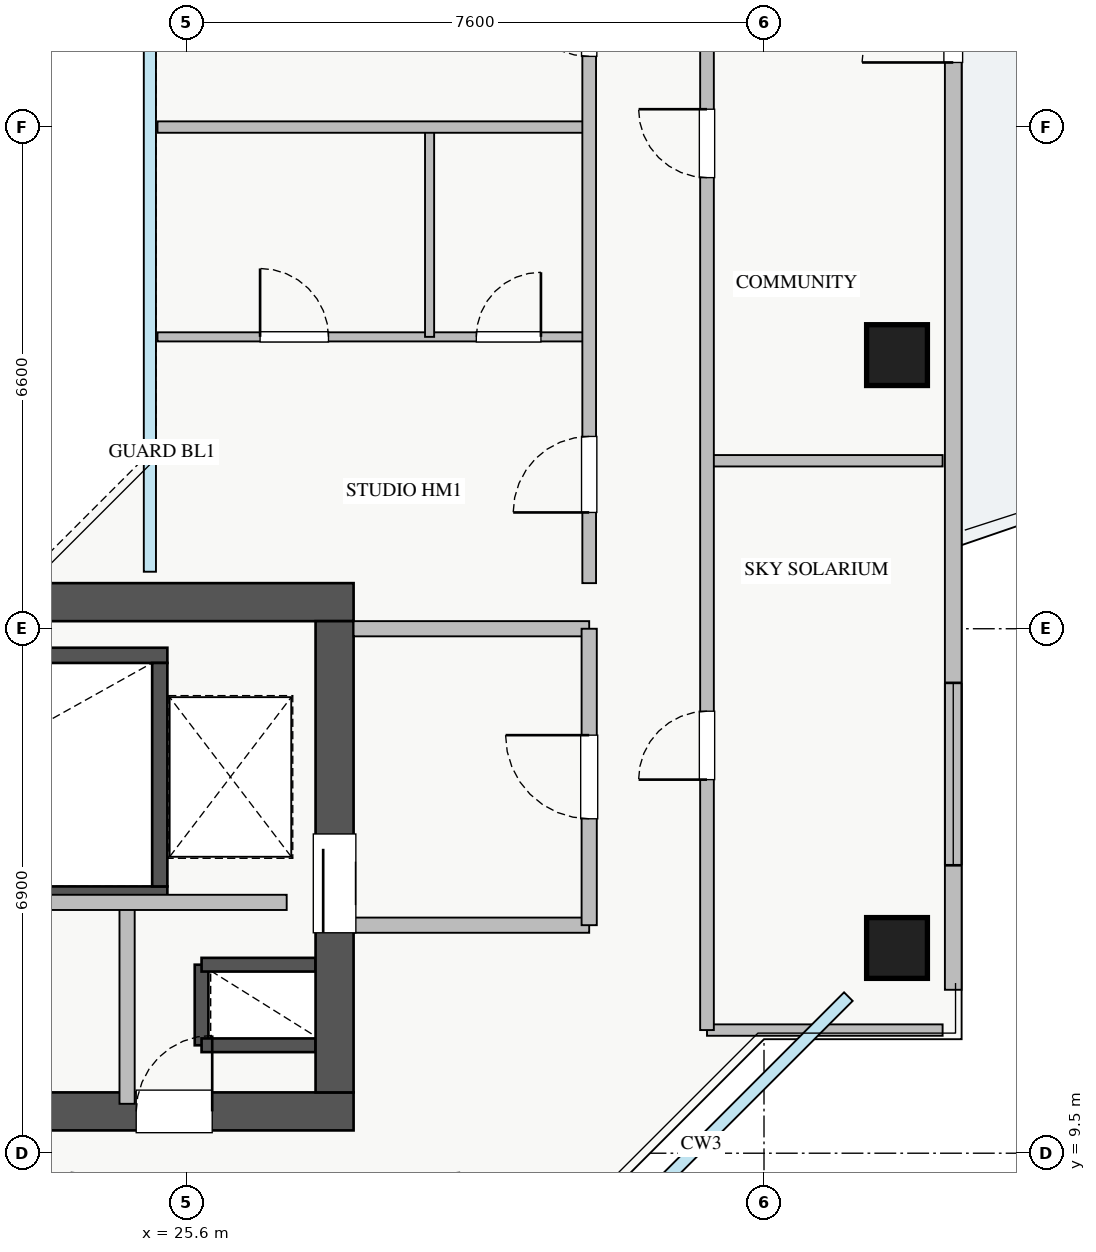
"""IFC4 building model, lengths in metres.
Left out: names, types, materials, properties, quantities, classifications, styles, units other than length and angle.
Written with IfcOpenShell. Run it as: python <this file> out.ifc"""

import sys

from ifc_helpers import new_model, si_unit, direction, frame, frame_2d, origin, origin_2d, place, context, subcontext, project, spatial, rectangle, extrude, source, transform, mapped, element, fill, save


model = new_model("IFC4")
c1 = context("Model", 3, precision=1e-05, world=origin(), true_north=direction((0.0, 1.0)))
c2 = subcontext(c1, "Body", "Model", "MODEL_VIEW")
j1 = project(units=[si_unit("LENGTHUNIT", "METRE"), si_unit("PLANEANGLEUNIT", "RADIAN")], contexts=[c1])
p1 = place(None, origin())
s1 = spatial("IfcSite", under=j1, at=p1, CompositionType="ELEMENT")
p2 = place(p1, origin())
s2 = spatial("IfcBuilding", under=s1, at=p2, CompositionType="ELEMENT")
p3 = place(p2, frame((0.0, 0.0, 206.75)))
s3 = spatial("IfcBuildingStorey", under=s2, at=p3, CompositionType="ELEMENT", Elevation=206.75)
p4 = place(p3, frame((25.8, 10.92, 0.0), z_axis=(0.0, 0.0, 1.0), x_axis=(0.0, 1.0, 0.0)))
e1 = element("IfcWall", 1, at=p4, inside=s3, PredefinedType="SHEAR", context=c2, shape_type="SweptSolid", body=[
    extrude(rectangle(XDim=1.06, YDim=0.18, at=frame_2d((0.53, 0.0))), origin(), (0.0, 0.0, 1.0), 3.07),
])
for number, where, z_axis, x_axis in (
    (2, (25.8, 11.98, 0.0), (0.0, 0.0, 1.0), (1.0, 0.0, 0.0)),
    (3, (25.8, 10.92, 0.0), (0.0, 0.0, 1.0), (1.0, 0.0, 0.0)),
):
    element("IfcWall", number, at=place(p3, frame(where, z_axis=z_axis, x_axis=x_axis)), inside=s3, PredefinedType="SHEAR", context=c2, shape_type="SweptSolid", body=[
        extrude(rectangle(XDim=1.5, YDim=0.18, at=frame_2d((0.75, 0.0))), origin(), (0.0, 0.0, 1.0), 3.07),
    ])
p5 = place(p3, frame((18.2, 12.91, 0.0), z_axis=(0.0, 0.0, 1.0), x_axis=(1.0, 0.0, 0.0)))
e4 = element("IfcWall", 4, at=p5, inside=s3, PredefinedType="SHEAR", context=c2, shape_type="SweptSolid", body=[
    extrude(rectangle(XDim=7.15, YDim=0.2, at=frame_2d((3.575, 0.0))), origin(), (0.0, 0.0, 1.0), 3.25),
])
p6 = place(p5, frame((0.35, 0.0, 0.0)))
e5 = element("IfcOpeningElement", 5, at=p6, cuts=e4, PredefinedType="OPENING", context=c2, shape_type="SweptSolid", body=[
    extrude(rectangle(XDim=1.1, YDim=2.05, at=frame_2d((0.55, 1.025))), frame((0.0, 0.11, 0.0), z_axis=(0.0, -1.0, 0.0), x_axis=(1.0, 0.0, 0.0)), (0.0, 0.0, 1.0), 0.22),
])
p7 = place(p3, frame((18.2, 16.05, 0.0), z_axis=(0.0, 0.0, 1.0), x_axis=(1.0, 0.0, 0.0)))
e6 = element("IfcWall", 6, at=p7, inside=s3, PredefinedType="SHEAR", context=c2, shape_type="SweptSolid", body=[
    extrude(rectangle(XDim=7.15, YDim=0.2, at=frame_2d((3.575, 0.0))), origin(), (0.0, 0.0, 1.0), 3.25),
])
p8 = place(p3, frame((25.25, 13.01, 0.0), z_axis=(0.0, 0.0, 1.0), x_axis=(0.0, 1.0, 0.0)))
e7 = element("IfcWall", 7, at=p8, inside=s3, PredefinedType="SHEAR", context=c2, shape_type="SweptSolid", body=[
    extrude(rectangle(XDim=2.94, YDim=0.2, at=frame_2d((1.47, 0.0))), origin(), (0.0, 0.0, 1.0), 3.25),
])
p9 = place(p3, frame((10.2, 10.05, 0.0), z_axis=(0.0, 0.0, 1.0), x_axis=(1.0, 0.0, 0.0)))
e8 = element("IfcWall", 8, at=p9, inside=s3, PredefinedType="SHEAR", context=c2, shape_type="SweptSolid", body=[
    extrude(rectangle(XDim=17.6, YDim=0.5, at=frame_2d((8.8, 0.0))), origin(), (0.0, 0.0, 1.0), 3.25),
])
p10 = place(p9, frame((1.15, 0.0, 0.0)))
e9 = element("IfcOpeningElement", 9, at=p10, cuts=e8, PredefinedType="OPENING", context=c2, shape_type="SweptSolid", body=[
    extrude(rectangle(XDim=1.1, YDim=2.05, at=frame_2d((0.55, 1.025))), frame((0.0, 0.26, 0.0), z_axis=(0.0, -1.0, 0.0), x_axis=(1.0, 0.0, 0.0)), (0.0, 0.0, 1.0), 0.52),
])
p11 = place(p9, frame((8.3, 0.0, 0.0)))
e10 = element("IfcOpeningElement", 10, at=p11, cuts=e8, PredefinedType="OPENING", context=c2, shape_type="SweptSolid", body=[
    extrude(rectangle(XDim=1.1, YDim=2.05, at=frame_2d((0.55, 1.025))), frame((0.0, 0.26, 0.0), z_axis=(0.0, -1.0, 0.0), x_axis=(1.0, 0.0, 0.0)), (0.0, 0.0, 1.0), 0.52),
])
p12 = place(p9, frame((2.85, 0.0, 0.0)))
e11 = element("IfcOpeningElement", 11, at=p12, cuts=e8, PredefinedType="OPENING", context=c2, shape_type="SweptSolid", body=[
    extrude(rectangle(XDim=1.1, YDim=2.05, at=frame_2d((0.55, 1.025))), frame((0.0, 0.26, 0.0), z_axis=(0.0, -1.0, 0.0), x_axis=(1.0, 0.0, 0.0)), (0.0, 0.0, 1.0), 0.52),
])
p13 = place(p9, frame((5.8, 0.0, 0.0)))
e12 = element("IfcOpeningElement", 12, at=p13, cuts=e8, PredefinedType="OPENING", context=c2, shape_type="SweptSolid", body=[
    extrude(rectangle(XDim=1.0, YDim=2.05, at=frame_2d((0.5, 1.025))), frame((0.0, 0.26, 0.0), z_axis=(0.0, -1.0, 0.0), x_axis=(1.0, 0.0, 0.0)), (0.0, 0.0, 1.0), 0.52),
])
p14 = place(p9, frame((14.74, 0.0, 0.0)))
e13 = element("IfcOpeningElement", 13, at=p14, cuts=e8, PredefinedType="OPENING", context=c2, shape_type="SweptSolid", body=[
    extrude(rectangle(XDim=1.0, YDim=2.05, at=frame_2d((0.5, 1.025))), frame((0.0, 0.26, 0.0), z_axis=(0.0, -1.0, 0.0), x_axis=(1.0, 0.0, 0.0)), (0.0, 0.0, 1.0), 0.52),
])
p15 = place(p9, frame((11.67, 0.0, 0.0)))
e14 = element("IfcOpeningElement", 14, at=p15, cuts=e8, PredefinedType="OPENING", context=c2, shape_type="SweptSolid", body=[
    extrude(rectangle(XDim=1.0, YDim=2.05, at=frame_2d((0.5, 1.025))), frame((0.0, 0.26, 0.0), z_axis=(0.0, -1.0, 0.0), x_axis=(1.0, 0.0, 0.0)), (0.0, 0.0, 1.0), 0.52),
])
p16 = place(p3, frame((10.2, 16.75, 0.0), z_axis=(0.0, 0.0, 1.0), x_axis=(1.0, 0.0, 0.0)))
e15 = element("IfcWall", 15, at=p16, inside=s3, PredefinedType="SHEAR", context=c2, shape_type="SweptSolid", body=[
    extrude(rectangle(XDim=17.6, YDim=0.5, at=frame_2d((8.8, 0.0))), origin(), (0.0, 0.0, 1.0), 3.25),
])
p17 = place(p3, frame((27.55, 10.3, 0.0), z_axis=(0.0, 0.0, 1.0), x_axis=(0.0, 1.0, 0.0)))
e16 = element("IfcWall", 16, at=p17, inside=s3, PredefinedType="SHEAR", context=c2, shape_type="SweptSolid", body=[
    extrude(rectangle(XDim=6.2, YDim=0.5, at=frame_2d((3.1, 0.0))), origin(), (0.0, 0.0, 1.0), 3.25),
])
p18 = place(p17, frame((2.1, 0.0, 0.0)))
e17 = element("IfcOpeningElement", 17, at=p18, cuts=e16, PredefinedType="OPENING", context=c2, shape_type="SweptSolid", body=[
    extrude(rectangle(XDim=1.3, YDim=2.05, at=frame_2d((0.65, 1.025))), frame((0.0, 0.26, 0.0), z_axis=(0.0, -1.0, 0.0), x_axis=(1.0, 0.0, 0.0)), (0.0, 0.0, 1.0), 0.52),
])
m1 = source(origin(), c2, "Body", "SweptSolid", [
    extrude(rectangle(XDim=0.8, YDim=0.8, at=origin_2d()), origin(), (0.0, 0.0, 1.0), 3.25),
])
for number, where, z_axis, x_axis in (
    (18, (34.95, 12.2, 0.0), (0.0, 0.0, 1.0), (1.0, 0.0, 0.0)),
    (19, (34.95, 20.0, 0.0), (0.0, 0.0, 1.0), (1.0, 0.0, 0.0)),
):
    element("IfcColumn", number, at=place(p3, frame(where, z_axis=z_axis, x_axis=x_axis)), inside=s3, PredefinedType="COLUMN", context=c2, shape_type="MappedRepresentation", body=[
        mapped(m1, transform((0.0, 0.0, 0.0), x_axis=(1.0, 0.0, 0.0), y_axis=(0.0, 1.0, 0.0), z_axis=(0.0, 0.0, 1.0), scale=1.0)),
    ])
p19 = place(p3, frame((35.69, 11.65, 0.0), z_axis=(0.0, 0.0, 1.0), x_axis=(0.0, 1.0, 0.0)))
e20 = element("IfcWall", 20, at=p19, inside=s3, PredefinedType="STANDARD", context=c2, shape_type="SweptSolid", body=[
    extrude(rectangle(XDim=22.7, YDim=0.22, at=frame_2d((11.35, 0.0))), origin(), (0.0, 0.0, 1.0), 2.61),
])
p20 = place(p19, frame((12.2, 0.0, 0.0)))
e21 = element("IfcOpeningElement", 21, at=p20, cuts=e20, PredefinedType="OPENING", context=c2, shape_type="SweptSolid", body=[
    extrude(rectangle(XDim=1.2, YDim=2.1, at=frame_2d((0.6, 1.05))), frame((0.0, 0.12, 0.0), z_axis=(0.0, -1.0, 0.0), x_axis=(1.0, 0.0, 0.0)), (0.0, 0.0, 1.0), 0.24),
])
p21 = place(p19, frame((1.638, 0.0, 0.9)))
e22 = element("IfcOpeningElement", 22, at=p21, cuts=e20, PredefinedType="OPENING", context=c2, shape_type="SweptSolid", body=[
    extrude(rectangle(XDim=2.4, YDim=1.48, at=frame_2d((1.2, 0.74))), frame((0.0, 0.12, 0.0), z_axis=(0.0, -1.0, 0.0), x_axis=(1.0, 0.0, 0.0)), (0.0, 0.0, 1.0), 0.24),
])
p22 = place(p19, frame((18.813, 0.0, 0.9)))
e23 = element("IfcOpeningElement", 23, at=p22, cuts=e20, PredefinedType="OPENING", context=c2, shape_type="SweptSolid", body=[
    extrude(rectangle(XDim=2.1, YDim=1.48, at=frame_2d((1.05, 0.74))), frame((0.0, 0.12, 0.0), z_axis=(0.0, -1.0, 0.0), x_axis=(1.0, 0.0, 0.0)), (0.0, 0.0, 1.0), 0.24),
])
p23 = place(p3, frame((27.8, 16.4, 0.0), z_axis=(0.0, 0.0, 1.0), x_axis=(1.0, 0.0, 0.0)))
e24 = element("IfcWall", 24, at=p23, inside=s3, PredefinedType="PARTITIONING", context=c2, shape_type="SweptSolid", body=[
    extrude(rectangle(XDim=3.1, YDim=0.2, at=frame_2d((1.55, 0.0))), origin(), (0.0, 0.0, 1.0), 3.07),
])
p24 = place(p3, frame((27.8, 12.5, 0.0), z_axis=(0.0, 0.0, 1.0), x_axis=(1.0, 0.0, 0.0)))
e25 = element("IfcWall", 25, at=p24, inside=s3, PredefinedType="PARTITIONING", context=c2, shape_type="SweptSolid", body=[
    extrude(rectangle(XDim=3.1, YDim=0.2, at=frame_2d((1.55, 0.0))), origin(), (0.0, 0.0, 1.0), 2.265),
])
p25 = place(p3, frame((30.9, 12.5, 0.0), z_axis=(0.0, 0.0, 1.0), x_axis=(0.0, 1.0, 0.0)))
e26 = element("IfcWall", 26, at=p25, inside=s3, PredefinedType="PARTITIONING", context=c2, shape_type="SweptSolid", body=[
    extrude(rectangle(XDim=3.9, YDim=0.2, at=frame_2d((1.95, 0.0))), origin(), (0.0, 0.0, 1.0), 3.07),
])
p26 = place(p25, frame((1.4, 0.0, 0.0)))
e27 = element("IfcOpeningElement", 27, at=p26, cuts=e26, PredefinedType="OPENING", context=c2, shape_type="SweptSolid", body=[
    extrude(rectangle(XDim=1.1, YDim=2.05, at=frame_2d((0.55, 1.025))), frame((0.0, 0.11, 0.0), z_axis=(0.0, -1.0, 0.0), x_axis=(1.0, 0.0, 0.0)), (0.0, 0.0, 1.0), 0.22),
])
p27 = place(p3, frame((24.82, 10.15, 0.0), z_axis=(0.0, 0.0, 1.0), x_axis=(0.0, 1.0, 0.0)))
e28 = element("IfcWall", 28, at=p27, inside=s3, PredefinedType="PARTITIONING", context=c2, shape_type="SweptSolid", body=[
    extrude(rectangle(XDim=2.65, YDim=0.2, at=frame_2d((1.325, 0.0))), origin(), (0.0, 0.0, 1.0), 3.07),
])
p28 = place(p3, frame((21.75, 12.8, 0.0), z_axis=(0.0, 0.0, 1.0), x_axis=(1.0, 0.0, 0.0)))
e29 = element("IfcWall", 29, at=p28, inside=s3, PredefinedType="PARTITIONING", context=c2, shape_type="SweptSolid", body=[
    extrude(rectangle(XDim=5.17, YDim=0.2, at=frame_2d((2.585, 0.0))), origin(), (0.0, 0.0, 1.0), 3.07),
])
p29 = place(p3, frame((25.22, 20.24, 0.0), z_axis=(0.0, 0.0, 1.0), x_axis=(1.0, 0.0, 0.0)))
e30 = element("IfcWall", 30, at=p29, inside=s3, PredefinedType="PLUMBINGWALL", context=c2, shape_type="SweptSolid", body=[
    extrude(rectangle(XDim=5.68, YDim=0.12, at=frame_2d((2.84, 0.0))), origin(), (0.0, 0.0, 1.0), 2.675),
])
p30 = place(p29, frame((1.35, 0.0, 0.0)))
e31 = element("IfcOpeningElement", 31, at=p30, cuts=e30, PredefinedType="OPENING", context=c2, shape_type="SweptSolid", body=[
    extrude(rectangle(XDim=0.9, YDim=2.05, at=frame_2d((0.45, 1.025))), frame((0.0, 0.07, 0.0), z_axis=(0.0, -1.0, 0.0), x_axis=(1.0, 0.0, 0.0)), (0.0, 0.0, 1.0), 0.14),
])
p31 = place(p29, frame((4.195, 0.0, 0.0)))
e32 = element("IfcOpeningElement", 32, at=p31, cuts=e30, PredefinedType="OPENING", context=c2, shape_type="SweptSolid", body=[
    extrude(rectangle(XDim=0.85, YDim=2.05, at=frame_2d((0.425, 1.025))), frame((0.0, 0.07, 0.0), z_axis=(0.0, -1.0, 0.0), x_axis=(1.0, 0.0, 0.0)), (0.0, 0.0, 1.0), 0.14),
])
p32 = place(p3, frame((28.8, 20.24, 0.0), z_axis=(0.0, 0.0, 1.0), x_axis=(0.0, 1.0, 0.0)))
e33 = element("IfcWall", 33, at=p32, inside=s3, PredefinedType="PLUMBINGWALL", context=c2, shape_type="SweptSolid", body=[
    extrude(rectangle(XDim=2.76, YDim=0.12, at=frame_2d((1.38, 0.0))), origin(), (0.0, 0.0, 1.0), 3.07),
])
p33 = place(p3, frame((25.22, 23.0, 0.0), z_axis=(0.0, 0.0, 1.0), x_axis=(1.0, 0.0, 0.0)))
e34 = element("IfcWall", 34, at=p33, inside=s3, PredefinedType="PARTITIONING", context=c2, shape_type="SweptSolid", body=[
    extrude(rectangle(XDim=5.68, YDim=0.15, at=frame_2d((2.84, 0.0))), origin(), (0.0, 0.0, 1.0), 3.07),
])
p34 = place(p3, frame((30.9, 17.0, 0.0), z_axis=(0.0, 0.0, 1.0), x_axis=(0.0, 1.0, 0.0)))
e35 = element("IfcWall", 35, at=p34, inside=s3, PredefinedType="PARTITIONING", context=c2, shape_type="SweptSolid", body=[
    extrude(rectangle(XDim=12.0, YDim=0.18, at=frame_2d((6.0, 0.0))), origin(), (0.0, 0.0, 1.0), 3.07),
])
p35 = place(p34, frame((0.93, 0.0, 0.0)))
e36 = element("IfcOpeningElement", 36, at=p35, cuts=e35, PredefinedType="OPENING", context=c2, shape_type="SweptSolid", body=[
    extrude(rectangle(XDim=1.0, YDim=2.05, at=frame_2d((0.5, 1.025))), frame((0.0, 0.1, 0.0), z_axis=(0.0, -1.0, 0.0), x_axis=(1.0, 0.0, 0.0)), (0.0, 0.0, 1.0), 0.2),
])
p36 = place(p34, frame((6.93, 0.0, 0.0)))
e37 = element("IfcOpeningElement", 37, at=p36, cuts=e35, PredefinedType="OPENING", context=c2, shape_type="SweptSolid", body=[
    extrude(rectangle(XDim=1.0, YDim=2.05, at=frame_2d((0.5, 1.025))), frame((0.0, 0.1, 0.0), z_axis=(0.0, -1.0, 0.0), x_axis=(1.0, 0.0, 0.0)), (0.0, 0.0, 1.0), 0.2),
])
for number, where, z_axis, x_axis in (
    (38, (32.45, 11.12, 0.0), (0.0, 0.0, 1.0), (1.0, 0.0, 0.0)),
    (39, (32.45, 18.61, 0.0), (0.0, 0.0, 1.0), (1.0, 0.0, 0.0)),
):
    element("IfcWall", number, at=place(p3, frame(where, z_axis=z_axis, x_axis=x_axis)), inside=s3, PredefinedType="PARTITIONING", context=c2, shape_type="SweptSolid", body=[
        extrude(rectangle(XDim=3.1, YDim=0.15, at=frame_2d((1.55, 0.0))), origin(), (0.0, 0.0, 1.0), 3.07),
    ])
p37 = place(p3, frame((32.45, 11.12, 0.0), z_axis=(0.0, 0.0, 1.0), x_axis=(0.0, 1.0, 0.0)))
e40 = element("IfcWall", 40, at=p37, inside=s3, PredefinedType="PARTITIONING", context=c2, shape_type="SweptSolid", body=[
    extrude(rectangle(XDim=23.76, YDim=0.18, at=frame_2d((11.88, 0.0))), origin(), (0.0, 0.0, 1.0), 3.07),
])
p38 = place(p37, frame((3.295, 0.0, 0.0)))
e41 = element("IfcOpeningElement", 41, at=p38, cuts=e40, PredefinedType="OPENING", context=c2, shape_type="SweptSolid", body=[
    extrude(rectangle(XDim=0.9, YDim=2.05, at=frame_2d((0.45, 1.025))), frame((0.0, 0.1, 0.0), z_axis=(0.0, -1.0, 0.0), x_axis=(1.0, 0.0, 0.0)), (0.0, 0.0, 1.0), 0.2),
])
p39 = place(p37, frame((11.215, 0.0, 0.0)))
e42 = element("IfcOpeningElement", 42, at=p39, cuts=e40, PredefinedType="OPENING", context=c2, shape_type="SweptSolid", body=[
    extrude(rectangle(XDim=0.9, YDim=2.05, at=frame_2d((0.45, 1.025))), frame((0.0, 0.1, 0.0), z_axis=(0.0, -1.0, 0.0), x_axis=(1.0, 0.0, 0.0)), (0.0, 0.0, 1.0), 0.2),
])
p40 = place(p37, frame((19.35, 0.0, 0.0)))
e43 = element("IfcOpeningElement", 43, at=p40, cuts=e40, PredefinedType="OPENING", context=c2, shape_type="SweptSolid", body=[
    extrude(rectangle(XDim=0.9, YDim=2.05, at=frame_2d((0.45, 1.025))), frame((0.0, 0.1, 0.0), z_axis=(0.0, -1.0, 0.0), x_axis=(1.0, 0.0, 0.0)), (0.0, 0.0, 1.0), 0.2),
])
m2 = source(origin(), c2, "Body", "SweptSolid", [
    extrude(rectangle(XDim=1.2, YDim=2.1, at=frame_2d((0.6, 1.05))), frame((0.0, 0.025, 0.0), z_axis=(0.0, -1.0, 0.0), x_axis=(1.0, 0.0, 0.0)), (0.0, 0.0, 1.0), 0.05),
])
p41 = place(p20, origin())
e44 = element("IfcDoor", 44, at=p41, inside=s3, OperationType="SINGLE_SWING_LEFT", PredefinedType="DOOR", context=c2, shape_type="MappedRepresentation", body=[
    mapped(m2, transform((0.0, 0.0, 0.0), x_axis=(1.0, 0.0, 0.0), y_axis=(0.0, 1.0, 0.0), z_axis=(0.0, 0.0, 1.0), scale=1.0)),
])
fill(e21, e44)
m3 = source(origin(), c2, "Body", "SweptSolid", [
    extrude(rectangle(XDim=2.4, YDim=1.48, at=frame_2d((1.2, 0.74))), frame((0.0, 0.03, 0.0), z_axis=(0.0, -1.0, 0.0), x_axis=(1.0, 0.0, 0.0)), (0.0, 0.0, 1.0), 0.06),
])
p42 = place(p21, origin())
e45 = element("IfcWindow", 45, at=p42, inside=s3, PartitioningType="TRIPLE_PANEL_VERTICAL", PredefinedType="WINDOW", context=c2, shape_type="MappedRepresentation", body=[
    mapped(m3, transform((0.0, 0.0, 0.0), x_axis=(1.0, 0.0, 0.0), y_axis=(0.0, 1.0, 0.0), z_axis=(0.0, 0.0, 1.0), scale=1.0)),
])
fill(e22, e45)
m4 = source(origin(), c2, "Body", "SweptSolid", [
    extrude(rectangle(XDim=1.3, YDim=2.05, at=frame_2d((0.65, 1.025))), frame((0.0, 0.025, 0.0), z_axis=(0.0, -1.0, 0.0), x_axis=(1.0, 0.0, 0.0)), (0.0, 0.0, 1.0), 0.05),
])
p43 = place(p18, origin())
e46 = element("IfcDoor", 46, at=p43, inside=s3, OperationType="SLIDING_TO_RIGHT", PredefinedType="DOOR", context=c2, shape_type="MappedRepresentation", body=[
    mapped(m4, transform((0.0, 0.0, 0.0), x_axis=(1.0, 0.0, 0.0), y_axis=(0.0, 1.0, 0.0), z_axis=(0.0, 0.0, 1.0), scale=1.0)),
])
fill(e17, e46)
m5 = source(origin(), c2, "Body", "SweptSolid", [
    extrude(rectangle(XDim=1.0, YDim=2.05, at=frame_2d((0.5, 1.025))), frame((0.0, 0.025, 0.0), z_axis=(0.0, -1.0, 0.0), x_axis=(1.0, 0.0, 0.0)), (0.0, 0.0, 1.0), 0.05),
])
p44 = place(p14, origin())
e47 = element("IfcDoor", 47, at=p44, inside=s3, OperationType="SINGLE_SWING_RIGHT", PredefinedType="DOOR", context=c2, shape_type="MappedRepresentation", body=[
    mapped(m5, transform((0.0, 0.0, 0.0), x_axis=(1.0, 0.0, 0.0), y_axis=(0.0, 1.0, 0.0), z_axis=(0.0, 0.0, 1.0), scale=1.0)),
])
fill(e13, e47)
m6 = source(origin(), c2, "Body", "SweptSolid", [
    extrude(rectangle(XDim=1.1, YDim=2.05, at=frame_2d((0.55, 1.025))), frame((0.0, 0.025, 0.0), z_axis=(0.0, -1.0, 0.0), x_axis=(1.0, 0.0, 0.0)), (0.0, 0.0, 1.0), 0.05),
])
p45 = place(p26, origin())
e48 = element("IfcDoor", 48, at=p45, inside=s3, OperationType="SINGLE_SWING_RIGHT", PredefinedType="DOOR", context=c2, shape_type="MappedRepresentation", body=[
    mapped(m6, transform((0.0, 0.0, 0.0), x_axis=(1.0, 0.0, 0.0), y_axis=(0.0, 1.0, 0.0), z_axis=(0.0, 0.0, 1.0), scale=1.0)),
])
fill(e27, e48)
m7 = source(origin(), c2, "Body", "SweptSolid", [
    extrude(rectangle(XDim=0.9, YDim=2.05, at=frame_2d((0.45, 1.025))), frame((0.0, 0.025, 0.0), z_axis=(0.0, -1.0, 0.0), x_axis=(1.0, 0.0, 0.0)), (0.0, 0.0, 1.0), 0.05),
])
p46 = place(p30, origin())
e49 = element("IfcDoor", 49, at=p46, inside=s3, OperationType="SINGLE_SWING_LEFT", PredefinedType="DOOR", context=c2, shape_type="MappedRepresentation", body=[
    mapped(m7, transform((0.0, 0.0, 0.0), x_axis=(1.0, 0.0, 0.0), y_axis=(0.0, 1.0, 0.0), z_axis=(0.0, 0.0, 1.0), scale=1.0)),
])
fill(e31, e49)
m8 = source(origin(), c2, "Body", "SweptSolid", [
    extrude(rectangle(XDim=0.85, YDim=2.05, at=frame_2d((0.425, 1.025))), frame((0.0, 0.025, 0.0), z_axis=(0.0, -1.0, 0.0), x_axis=(1.0, 0.0, 0.0)), (0.0, 0.0, 1.0), 0.05),
])
p47 = place(p31, origin())
e50 = element("IfcDoor", 50, at=p47, inside=s3, OperationType="SINGLE_SWING_RIGHT", PredefinedType="DOOR", context=c2, shape_type="MappedRepresentation", body=[
    mapped(m8, transform((0.0, 0.0, 0.0), x_axis=(1.0, 0.0, 0.0), y_axis=(0.0, 1.0, 0.0), z_axis=(0.0, 0.0, 1.0), scale=1.0)),
])
fill(e32, e50)
p48 = place(p35, origin())
e51 = element("IfcDoor", 51, at=p48, inside=s3, OperationType="SINGLE_SWING_LEFT", PredefinedType="DOOR", context=c2, shape_type="MappedRepresentation", body=[
    mapped(m5, transform((0.0, 0.0, 0.0), x_axis=(1.0, 0.0, 0.0), y_axis=(0.0, 1.0, 0.0), z_axis=(0.0, 0.0, 1.0), scale=1.0)),
])
fill(e36, e51)
p49 = place(p36, origin())
e52 = element("IfcDoor", 52, at=p49, inside=s3, OperationType="SINGLE_SWING_RIGHT", PredefinedType="DOOR", context=c2, shape_type="MappedRepresentation", body=[
    mapped(m5, transform((0.0, 0.0, 0.0), x_axis=(1.0, 0.0, 0.0), y_axis=(0.0, 1.0, 0.0), z_axis=(0.0, 0.0, 1.0), scale=1.0)),
])
fill(e37, e52)
p50 = place(p38, origin())
e53 = element("IfcDoor", 53, at=p50, inside=s3, OperationType="SINGLE_SWING_LEFT", PredefinedType="DOOR", context=c2, shape_type="MappedRepresentation", body=[
    mapped(m7, transform((0.0, 0.0, 0.0), x_axis=(1.0, 0.0, 0.0), y_axis=(0.0, 1.0, 0.0), z_axis=(0.0, 0.0, 1.0), scale=1.0)),
])
fill(e41, e53)
p51 = place(p39, origin())
e54 = element("IfcDoor", 54, at=p51, inside=s3, OperationType="SINGLE_SWING_RIGHT", PredefinedType="DOOR", context=c2, shape_type="MappedRepresentation", body=[
    mapped(m7, transform((0.0, 0.0, 0.0), x_axis=(1.0, 0.0, 0.0), y_axis=(0.0, 1.0, 0.0), z_axis=(0.0, 0.0, 1.0), scale=1.0)),
])
fill(e42, e54)
save(model, sys.argv[1])
